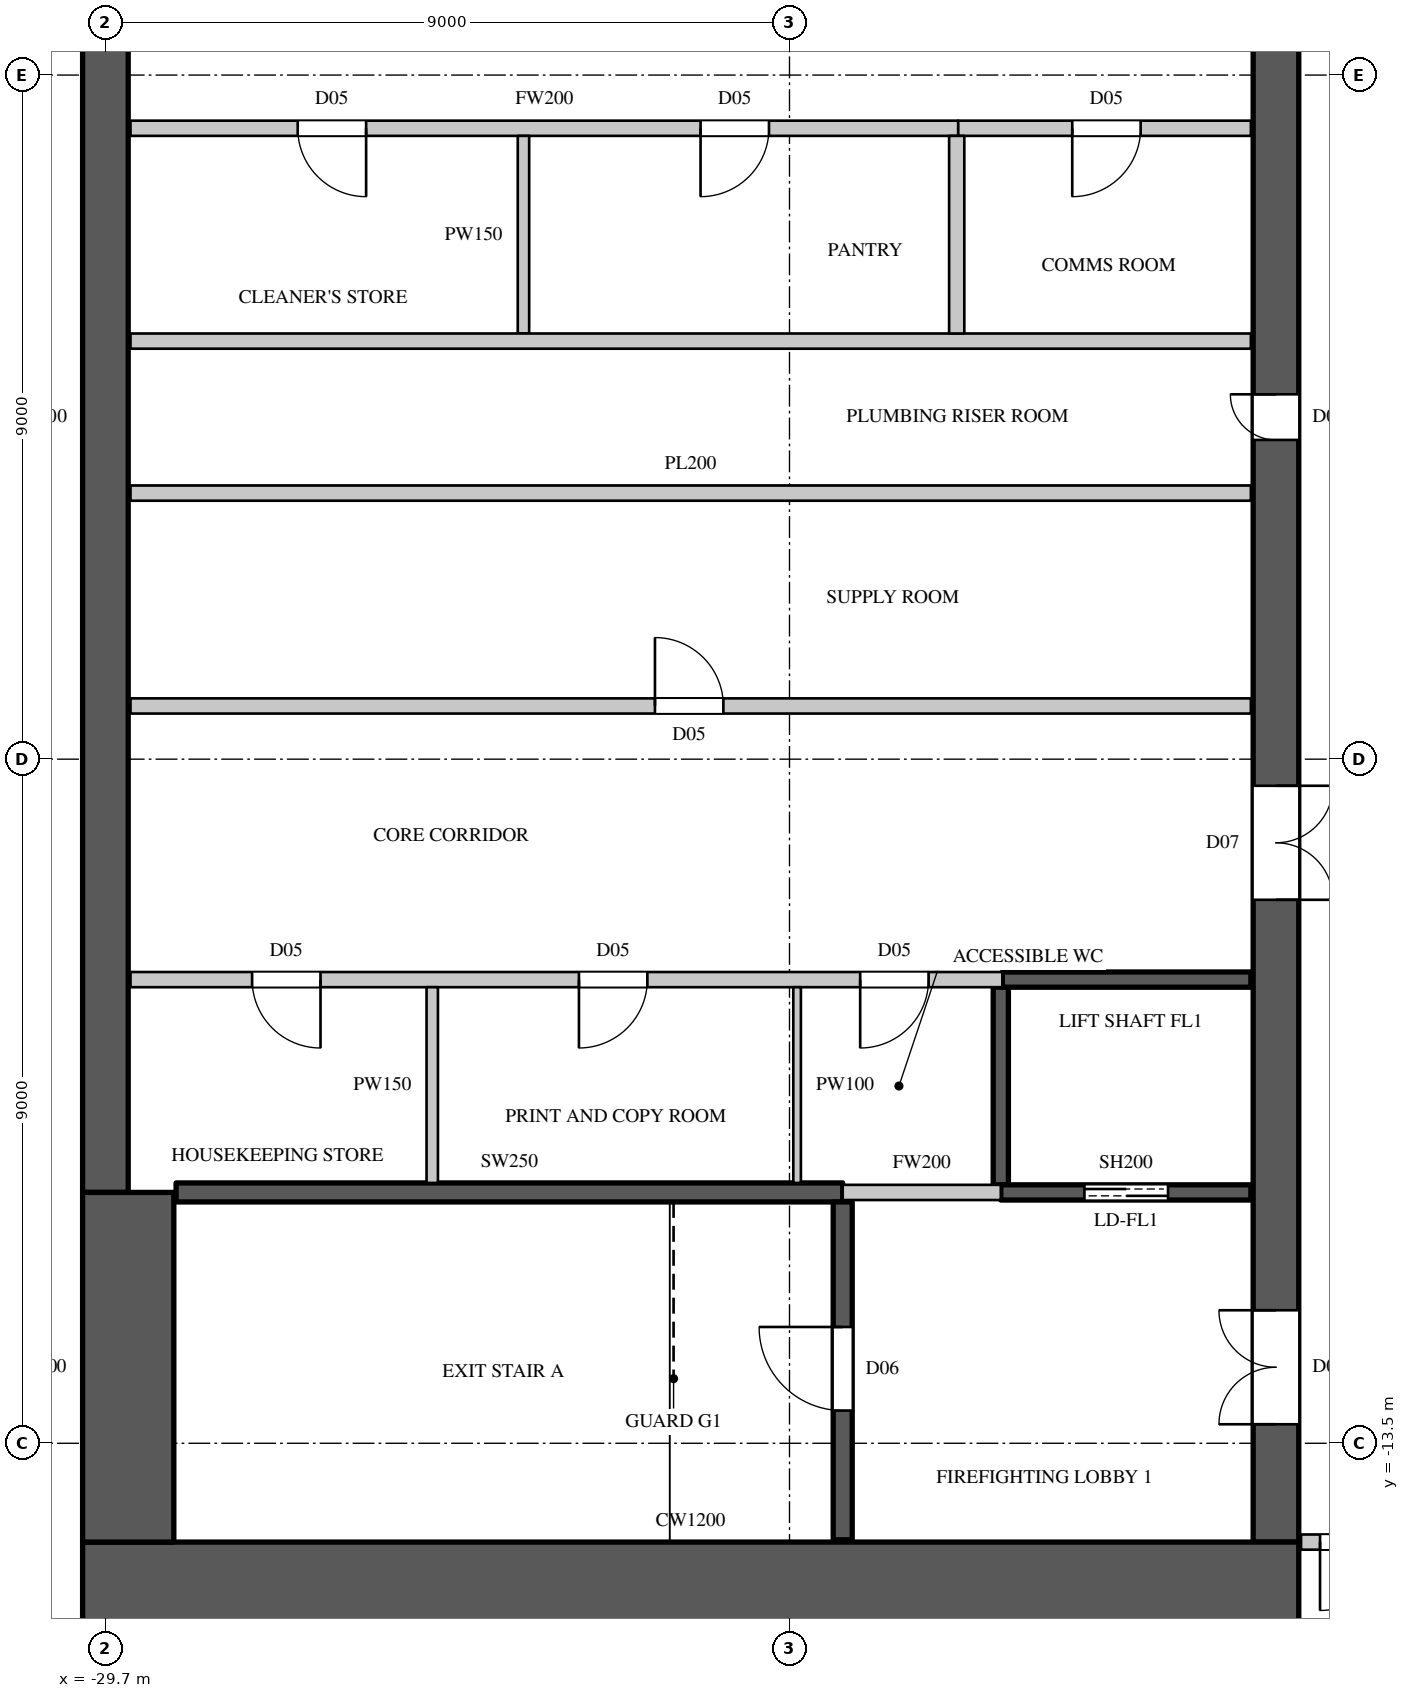
"""IFC4 building model, lengths in metres.
Left out: names, types, materials, properties, quantities, classifications, styles, units other than length and angle.
Written with IfcOpenShell. Run it as: python <this file> out.ifc"""

import sys

from ifc_helpers import new_model, si_unit, direction, frame, frame_2d, origin, place, context, subcontext, project, spatial, rectangle, extrude, element, fill, save


model = new_model("IFC4")
c1 = context("Model", 3, precision=1e-05, world=origin(), true_north=direction((0.0, 1.0)))
c2 = subcontext(c1, "Body", "Model", "MODEL_VIEW")
j1 = project(units=[si_unit("LENGTHUNIT", "METRE"), si_unit("PLANEANGLEUNIT", "RADIAN")], contexts=[c1])
p1 = place(None, origin())
s1 = spatial("IfcSite", under=j1, at=p1, CompositionType="ELEMENT")
p2 = place(p1, origin())
s2 = spatial("IfcBuilding", under=s1, at=p2, CompositionType="ELEMENT")
p3 = place(p2, frame((0.0, 0.0, 355.0)))
s3 = spatial("IfcBuildingStorey", under=s2, at=p3, CompositionType="ELEMENT", Elevation=355.0)
p4 = place(p3, frame((-30.0, -15.4, 0.0), z_axis=(0.0, 0.0, 1.0), x_axis=(1.0, 0.0, 0.0)))
e1 = element("IfcWall", 1, at=p4, inside=s3, PredefinedType="SHEAR", context=c2, shape_type="SweptSolid", body=[
    extrude(rectangle(XDim=16.0, YDim=1.2, at=frame_2d((8.0, 0.0))), origin(), (0.0, 0.0, 1.0), 4.0),
])
p5 = place(p3, frame((-14.3, -14.8, 0.0), z_axis=(0.0, 0.0, 1.0), x_axis=(0.0, 1.0, 0.0)))
e2 = element("IfcWall", 2, at=p5, inside=s3, PredefinedType="SHEAR", context=c2, shape_type="SweptSolid", body=[
    extrude(rectangle(XDim=29.6, YDim=0.6, at=frame_2d((14.8, 0.0))), origin(), (0.0, 0.0, 1.0), 4.0),
])
p6 = place(p5, frame((1.55, 0.0, 0.0)))
e3 = element("IfcOpeningElement", 3, at=p6, cuts=e2, PredefinedType="OPENING", context=c2, shape_type="SweptSolid", body=[
    extrude(rectangle(XDim=1.5, YDim=2.4, at=frame_2d((0.75, 1.2))), frame((0.0, 0.31, 0.0), z_axis=(0.0, -1.0, 0.0), x_axis=(1.0, 0.0, 0.0)), (0.0, 0.0, 1.0), 0.62),
])
p7 = place(p5, frame((26.55, 0.0, 0.0)))
e4 = element("IfcOpeningElement", 4, at=p7, cuts=e2, PredefinedType="OPENING", context=c2, shape_type="SweptSolid", body=[
    extrude(rectangle(XDim=1.5, YDim=2.4, at=frame_2d((0.75, 1.2))), frame((0.0, 0.31, 0.0), z_axis=(0.0, -1.0, 0.0), x_axis=(1.0, 0.0, 0.0)), (0.0, 0.0, 1.0), 0.62),
])
p8 = place(p5, frame((8.45, 0.0, 0.0)))
e5 = element("IfcOpeningElement", 5, at=p8, cuts=e2, PredefinedType="OPENING", context=c2, shape_type="SweptSolid", body=[
    extrude(rectangle(XDim=1.5, YDim=2.4, at=frame_2d((0.75, 1.2))), frame((0.0, 0.31, 0.0), z_axis=(0.0, -1.0, 0.0), x_axis=(1.0, 0.0, 0.0)), (0.0, 0.0, 1.0), 0.62),
])
p9 = place(p5, frame((19.65, 0.0, 0.0)))
e6 = element("IfcOpeningElement", 6, at=p9, cuts=e2, PredefinedType="OPENING", context=c2, shape_type="SweptSolid", body=[
    extrude(rectangle(XDim=1.5, YDim=2.4, at=frame_2d((0.75, 1.2))), frame((0.0, 0.31, 0.0), z_axis=(0.0, -1.0, 0.0), x_axis=(1.0, 0.0, 0.0)), (0.0, 0.0, 1.0), 0.62),
])
p10 = place(p5, frame((14.5, 0.0, 0.0)))
e7 = element("IfcOpeningElement", 7, at=p10, cuts=e2, PredefinedType="OPENING", context=c2, shape_type="SweptSolid", body=[
    extrude(rectangle(XDim=0.6, YDim=2.0, at=frame_2d((0.3, 1.0))), frame((0.0, 0.31, 0.0), z_axis=(0.0, -1.0, 0.0), x_axis=(1.0, 0.0, 0.0)), (0.0, 0.0, 1.0), 0.62),
])
p11 = place(p3, frame((-29.7, -10.2, 0.0), z_axis=(0.0, 0.0, 1.0), x_axis=(0.0, 1.0, 0.0)))
e8 = element("IfcWall", 8, at=p11, inside=s3, PredefinedType="SHEAR", context=c2, shape_type="SweptSolid", body=[
    extrude(rectangle(XDim=20.4, YDim=0.6, at=frame_2d((10.2, 0.0))), origin(), (0.0, 0.0, 1.0), 4.0),
])
p12 = place(p3, frame((-29.4, -14.8, 0.0), z_axis=(0.0, 0.0, 1.0), x_axis=(0.0, 1.0, 0.0)))
e9 = element("IfcWall", 9, at=p12, inside=s3, PredefinedType="SHEAR", context=c2, shape_type="SweptSolid", body=[
    extrude(rectangle(XDim=4.6, YDim=1.2, at=frame_2d((2.3, 0.0))), origin(), (0.0, 0.0, 1.0), 4.0),
])
p13 = place(p3, frame((-29.37, -7.4, 0.0), z_axis=(0.0, 0.0, 1.0), x_axis=(1.0, 0.0, 0.0)))
e10 = element("IfcWall", 10, at=p13, inside=s3, PredefinedType="PARTITIONING", context=c2, shape_type="SweptSolid", body=[
    extrude(rectangle(XDim=11.47, YDim=0.2, at=frame_2d((5.735, 0.0))), origin(), (0.0, 0.0, 1.0), 3.548),
])
p14 = place(p13, frame((1.6, 0.0, 0.0)))
e11 = element("IfcOpeningElement", 11, at=p14, cuts=e10, PredefinedType="OPENING", context=c2, shape_type="SweptSolid", body=[
    extrude(rectangle(XDim=0.9, YDim=2.2, at=frame_2d((0.45, 1.1))), frame((0.0, 0.11, 0.0), z_axis=(0.0, -1.0, 0.0), x_axis=(1.0, 0.0, 0.0)), (0.0, 0.0, 1.0), 0.22),
])
p15 = place(p13, frame((5.9, 0.0, 0.0)))
e12 = element("IfcOpeningElement", 12, at=p15, cuts=e10, PredefinedType="OPENING", context=c2, shape_type="SweptSolid", body=[
    extrude(rectangle(XDim=0.9, YDim=2.2, at=frame_2d((0.45, 1.1))), frame((0.0, 0.11, 0.0), z_axis=(0.0, -1.0, 0.0), x_axis=(1.0, 0.0, 0.0)), (0.0, 0.0, 1.0), 0.22),
])
p16 = place(p13, frame((9.6, 0.0, 0.0)))
e13 = element("IfcOpeningElement", 13, at=p16, cuts=e10, PredefinedType="OPENING", context=c2, shape_type="SweptSolid", body=[
    extrude(rectangle(XDim=0.9, YDim=2.2, at=frame_2d((0.45, 1.1))), frame((0.0, 0.11, 0.0), z_axis=(0.0, -1.0, 0.0), x_axis=(1.0, 0.0, 0.0)), (0.0, 0.0, 1.0), 0.22),
])
p17 = place(p3, frame((-29.37, -3.8, 0.0), z_axis=(0.0, 0.0, 1.0), x_axis=(1.0, 0.0, 0.0)))
e14 = element("IfcWall", 14, at=p17, inside=s3, PredefinedType="PARTITIONING", context=c2, shape_type="SweptSolid", body=[
    extrude(rectangle(XDim=14.74, YDim=0.2, at=frame_2d((7.37, 0.0))), origin(), (0.0, 0.0, 1.0), 3.548),
])
p18 = place(p17, frame((6.9, 0.0, 0.0)))
e15 = element("IfcOpeningElement", 15, at=p18, cuts=e14, PredefinedType="OPENING", context=c2, shape_type="SweptSolid", body=[
    extrude(rectangle(XDim=0.9, YDim=2.2, at=frame_2d((0.45, 1.1))), frame((0.0, 0.11, 0.0), z_axis=(0.0, -1.0, 0.0), x_axis=(1.0, 0.0, 0.0)), (0.0, 0.0, 1.0), 0.22),
])
p19 = place(p3, frame((-29.37, 3.8, 0.0), z_axis=(0.0, 0.0, 1.0), x_axis=(1.0, 0.0, 0.0)))
e16 = element("IfcWall", 16, at=p19, inside=s3, PredefinedType="PARTITIONING", context=c2, shape_type="SweptSolid", body=[
    extrude(rectangle(XDim=10.89, YDim=0.2, at=frame_2d((5.445, 0.0))), origin(), (0.0, 0.0, 1.0), 3.548),
])
p20 = place(p19, frame((2.2, 0.0, 0.0)))
e17 = element("IfcOpeningElement", 17, at=p20, cuts=e16, PredefinedType="OPENING", context=c2, shape_type="SweptSolid", body=[
    extrude(rectangle(XDim=0.9, YDim=2.2, at=frame_2d((0.45, 1.1))), frame((0.0, 0.11, 0.0), z_axis=(0.0, -1.0, 0.0), x_axis=(1.0, 0.0, 0.0)), (0.0, 0.0, 1.0), 0.22),
])
p21 = place(p19, frame((7.5, 0.0, 0.0)))
e18 = element("IfcOpeningElement", 18, at=p21, cuts=e16, PredefinedType="OPENING", context=c2, shape_type="SweptSolid", body=[
    extrude(rectangle(XDim=0.9, YDim=2.2, at=frame_2d((0.45, 1.1))), frame((0.0, 0.11, 0.0), z_axis=(0.0, -1.0, 0.0), x_axis=(1.0, 0.0, 0.0)), (0.0, 0.0, 1.0), 0.22),
])
p22 = place(p3, frame((-20.0, -10.2, 0.0), z_axis=(0.0, 0.0, 1.0), x_axis=(1.0, 0.0, 0.0)))
e19 = element("IfcWall", 19, at=p22, inside=s3, PredefinedType="PARTITIONING", context=c2, shape_type="SweptSolid", body=[
    extrude(rectangle(XDim=2.08, YDim=0.2, at=frame_2d((1.04, 0.0))), origin(), (0.0, 0.0, 1.0), 3.548),
])
p23 = place(p3, frame((-25.4, -10.075, 0.0), z_axis=(0.0, 0.0, 1.0), x_axis=(0.0, 1.0, 0.0)))
e20 = element("IfcWall", 20, at=p23, inside=s3, PredefinedType="PARTITIONING", context=c2, shape_type="SweptSolid", body=[
    extrude(rectangle(XDim=2.575, YDim=0.15, at=frame_2d((1.288, 0.0))), origin(), (0.0, 0.0, 1.0), 3.548),
])
p24 = place(p3, frame((-24.2, 1.1, 0.0), z_axis=(0.0, 0.0, 1.0), x_axis=(0.0, 1.0, 0.0)))
e21 = element("IfcWall", 21, at=p24, inside=s3, PredefinedType="PARTITIONING", context=c2, shape_type="SweptSolid", body=[
    extrude(rectangle(XDim=2.6, YDim=0.15, at=frame_2d((1.3, 0.0))), origin(), (0.0, 0.0, 1.0), 3.548),
])
for number, where, z_axis, x_axis in (
    (22, (-29.37, -1.0, 0.0), (0.0, 0.0, 1.0), (1.0, 0.0, 0.0)),
    (23, (-29.37, 1.0, 0.0), (0.0, 0.0, 1.0), (1.0, 0.0, 0.0)),
):
    element("IfcWall", number, at=place(p3, frame(where, z_axis=z_axis, x_axis=x_axis)), inside=s3, PredefinedType="PARTITIONING", context=c2, shape_type="SweptSolid", body=[
        extrude(rectangle(XDim=14.74, YDim=0.2, at=frame_2d((7.37, 0.0))), origin(), (0.0, 0.0, 1.0), 3.548),
    ])
p25 = place(p3, frame((-18.48, 3.8, 0.0), z_axis=(0.0, 0.0, 1.0), x_axis=(1.0, 0.0, 0.0)))
e24 = element("IfcWall", 24, at=p25, inside=s3, PredefinedType="PARTITIONING", context=c2, shape_type="SweptSolid", body=[
    extrude(rectangle(XDim=3.85, YDim=0.2, at=frame_2d((1.925, 0.0))), origin(), (0.0, 0.0, 1.0), 3.548),
])
p26 = place(p25, frame((1.5, 0.0, 0.0)))
e25 = element("IfcOpeningElement", 25, at=p26, cuts=e24, PredefinedType="OPENING", context=c2, shape_type="SweptSolid", body=[
    extrude(rectangle(XDim=0.9, YDim=2.2, at=frame_2d((0.45, 1.1))), frame((0.0, 0.11, 0.0), z_axis=(0.0, -1.0, 0.0), x_axis=(1.0, 0.0, 0.0)), (0.0, 0.0, 1.0), 0.22),
])
p27 = place(p3, frame((-18.5, 1.1, 0.0), z_axis=(0.0, 0.0, 1.0), x_axis=(0.0, 1.0, 0.0)))
e26 = element("IfcWall", 26, at=p27, inside=s3, PredefinedType="PARTITIONING", context=c2, shape_type="SweptSolid", body=[
    extrude(rectangle(XDim=2.6, YDim=0.2, at=frame_2d((1.3, 0.0))), origin(), (0.0, 0.0, 1.0), 3.548),
])
p28 = place(p3, frame((-13.97, -14.8, 0.0), z_axis=(0.0, 0.0, 1.0), x_axis=(1.0, 0.0, 0.0)))
e27 = element("IfcWall", 27, at=p28, inside=s3, PredefinedType="PARTITIONING", context=c2, shape_type="SweptSolid", body=[
    extrude(rectangle(XDim=2.27, YDim=0.2, at=frame_2d((1.135, 0.0))), origin(), (0.0, 0.0, 1.0), 3.548),
])
p29 = place(p28, frame((0.25, 0.0, 0.0)))
e28 = element("IfcOpeningElement", 28, at=p29, cuts=e27, PredefinedType="OPENING", context=c2, shape_type="SweptSolid", body=[
    extrude(rectangle(XDim=1.8, YDim=2.4, at=frame_2d((0.9, 1.2))), frame((0.0, 0.11, 0.0), z_axis=(0.0, -1.0, 0.0), x_axis=(1.0, 0.0, 0.0)), (0.0, 0.0, 1.0), 0.22),
])
p30 = place(p3, frame((-17.92, -10.1, 0.0), z_axis=(0.0, 0.0, 1.0), x_axis=(0.0, 1.0, 0.0)))
e29 = element("IfcWall", 29, at=p30, inside=s3, PredefinedType="SHEAR", context=c2, shape_type="SweptSolid", body=[
    extrude(rectangle(XDim=2.6, YDim=0.2, at=frame_2d((1.3, 0.0))), origin(), (0.0, 0.0, 1.0), 3.548),
])
p31 = place(p3, frame((-17.92, -10.2, 0.0), z_axis=(0.0, 0.0, 1.0), x_axis=(1.0, 0.0, 0.0)))
e30 = element("IfcWall", 30, at=p31, inside=s3, PredefinedType="SHEAR", context=c2, shape_type="SweptSolid", body=[
    extrude(rectangle(XDim=3.29, YDim=0.2, at=frame_2d((1.645, 0.0))), origin(), (0.0, 0.0, 1.0), 3.548),
])
p32 = place(p31, frame((1.1, 0.0, 0.0)))
e31 = element("IfcOpeningElement", 31, at=p32, cuts=e30, PredefinedType="OPENING", context=c2, shape_type="SweptSolid", body=[
    extrude(rectangle(XDim=1.1, YDim=2.2, at=frame_2d((0.55, 1.1))), frame((0.0, 0.11, 0.0), z_axis=(0.0, -1.0, 0.0), x_axis=(1.0, 0.0, 0.0)), (0.0, 0.0, 1.0), 0.22),
])
p33 = place(p3, frame((-17.9, -7.4, 0.0), z_axis=(0.0, 0.0, 1.0), x_axis=(1.0, 0.0, 0.0)))
e32 = element("IfcWall", 32, at=p33, inside=s3, PredefinedType="SHEAR", context=c2, shape_type="SweptSolid", body=[
    extrude(rectangle(XDim=3.27, YDim=0.2, at=frame_2d((1.635, 0.0))), origin(), (0.0, 0.0, 1.0), 3.548),
])
p34 = place(p3, frame((-28.77, -10.2, 0.0), z_axis=(0.0, 0.0, 1.0), x_axis=(1.0, 0.0, 0.0)))
e33 = element("IfcWall", 33, at=p34, inside=s3, PredefinedType="SHEAR", context=c2, shape_type="SweptSolid", body=[
    extrude(rectangle(XDim=8.77, YDim=0.25, at=frame_2d((4.385, 0.0))), origin(), (0.0, 0.0, 1.0), 3.548),
])
p35 = place(p3, frame((-20.0, -14.77, 0.0), z_axis=(0.0, 0.0, 1.0), x_axis=(0.0, 1.0, 0.0)))
e34 = element("IfcWall", 34, at=p35, inside=s3, PredefinedType="SHEAR", context=c2, shape_type="SweptSolid", body=[
    extrude(rectangle(XDim=4.445, YDim=0.25, at=frame_2d((2.223, 0.0))), origin(), (0.0, 0.0, 1.0), 3.548),
])
p36 = place(p35, frame((1.7, 0.0, 0.0)))
e35 = element("IfcOpeningElement", 35, at=p36, cuts=e34, PredefinedType="OPENING", context=c2, shape_type="SweptSolid", body=[
    extrude(rectangle(XDim=1.1, YDim=2.2, at=frame_2d((0.55, 1.1))), frame((0.0, 0.135, 0.0), z_axis=(0.0, -1.0, 0.0), x_axis=(1.0, 0.0, 0.0)), (0.0, 0.0, 1.0), 0.27),
])
p37 = place(p3, frame((-20.6, -10.075, 0.0), z_axis=(0.0, 0.0, 1.0), x_axis=(0.0, 1.0, 0.0)))
e36 = element("IfcWall", 36, at=p37, inside=s3, PredefinedType="PARTITIONING", context=c2, shape_type="SweptSolid", body=[
    extrude(rectangle(XDim=2.575, YDim=0.1, at=frame_2d((1.288, 0.0))), origin(), (0.0, 0.0, 1.0), 3.548),
])
p38 = place(p36, origin())
e37 = element("IfcDoor", 37, at=p38, inside=s3, OperationType="SINGLE_SWING_RIGHT", PredefinedType="DOOR", context=c2, shape_type="SweptSolid", body=[
    extrude(rectangle(XDim=1.1, YDim=2.2, at=frame_2d((0.55, 1.1))), frame((0.0, 0.025, 0.0), z_axis=(0.0, -1.0, 0.0), x_axis=(1.0, 0.0, 0.0)), (0.0, 0.0, 1.0), 0.05),
])
fill(e35, e37)
p39 = place(p14, origin())
e38 = element("IfcDoor", 38, at=p39, inside=s3, OperationType="SINGLE_SWING_LEFT", PredefinedType="DOOR", context=c2, shape_type="SweptSolid", body=[
    extrude(rectangle(XDim=0.9, YDim=2.2, at=frame_2d((0.45, 1.1))), frame((0.0, 0.025, 0.0), z_axis=(0.0, -1.0, 0.0), x_axis=(1.0, 0.0, 0.0)), (0.0, 0.0, 1.0), 0.05),
])
fill(e11, e38)
p40 = place(p15, origin())
e39 = element("IfcDoor", 39, at=p40, inside=s3, OperationType="SINGLE_SWING_RIGHT", PredefinedType="DOOR", context=c2, shape_type="SweptSolid", body=[
    extrude(rectangle(XDim=0.9, YDim=2.2, at=frame_2d((0.45, 1.1))), frame((0.0, 0.025, 0.0), z_axis=(0.0, -1.0, 0.0), x_axis=(1.0, 0.0, 0.0)), (0.0, 0.0, 1.0), 0.05),
])
fill(e12, e39)
p41 = place(p16, origin())
e40 = element("IfcDoor", 40, at=p41, inside=s3, OperationType="SINGLE_SWING_RIGHT", PredefinedType="DOOR", context=c2, shape_type="SweptSolid", body=[
    extrude(rectangle(XDim=0.9, YDim=2.2, at=frame_2d((0.45, 1.1))), frame((0.0, 0.025, 0.0), z_axis=(0.0, -1.0, 0.0), x_axis=(1.0, 0.0, 0.0)), (0.0, 0.0, 1.0), 0.05),
])
fill(e13, e40)
p42 = place(p18, origin())
e41 = element("IfcDoor", 41, at=p42, inside=s3, OperationType="SINGLE_SWING_LEFT", PredefinedType="DOOR", context=c2, shape_type="SweptSolid", body=[
    extrude(rectangle(XDim=0.9, YDim=2.2, at=frame_2d((0.45, 1.1))), frame((0.0, 0.025, 0.0), z_axis=(0.0, -1.0, 0.0), x_axis=(1.0, 0.0, 0.0)), (0.0, 0.0, 1.0), 0.05),
])
fill(e15, e41)
p43 = place(p20, origin())
e42 = element("IfcDoor", 42, at=p43, inside=s3, OperationType="SINGLE_SWING_LEFT", PredefinedType="DOOR", context=c2, shape_type="SweptSolid", body=[
    extrude(rectangle(XDim=0.9, YDim=2.2, at=frame_2d((0.45, 1.1))), frame((0.0, 0.025, 0.0), z_axis=(0.0, -1.0, 0.0), x_axis=(1.0, 0.0, 0.0)), (0.0, 0.0, 1.0), 0.05),
])
fill(e17, e42)
p44 = place(p21, origin())
e43 = element("IfcDoor", 43, at=p44, inside=s3, OperationType="SINGLE_SWING_RIGHT", PredefinedType="DOOR", context=c2, shape_type="SweptSolid", body=[
    extrude(rectangle(XDim=0.9, YDim=2.2, at=frame_2d((0.45, 1.1))), frame((0.0, 0.025, 0.0), z_axis=(0.0, -1.0, 0.0), x_axis=(1.0, 0.0, 0.0)), (0.0, 0.0, 1.0), 0.05),
])
fill(e18, e43)
p45 = place(p26, origin())
e44 = element("IfcDoor", 44, at=p45, inside=s3, OperationType="SINGLE_SWING_RIGHT", PredefinedType="DOOR", context=c2, shape_type="SweptSolid", body=[
    extrude(rectangle(XDim=0.9, YDim=2.2, at=frame_2d((0.45, 1.1))), frame((0.0, 0.025, 0.0), z_axis=(0.0, -1.0, 0.0), x_axis=(1.0, 0.0, 0.0)), (0.0, 0.0, 1.0), 0.05),
])
fill(e25, e44)
p46 = place(p32, origin())
e45 = element("IfcDoor", 45, at=p46, inside=s3, OperationType="DOUBLE_DOOR_SLIDING", PredefinedType="DOOR", context=c2, shape_type="SweptSolid", body=[
    extrude(rectangle(XDim=1.1, YDim=2.2, at=frame_2d((0.55, 1.1))), frame((0.0, 0.025, 0.0), z_axis=(0.0, -1.0, 0.0), x_axis=(1.0, 0.0, 0.0)), (0.0, 0.0, 1.0), 0.05),
])
fill(e31, e45)
p47 = place(p29, origin())
e46 = element("IfcDoor", 46, at=p47, inside=s3, OperationType="DOUBLE_DOOR_SINGLE_SWING", PredefinedType="DOOR", context=c2, shape_type="SweptSolid", body=[
    extrude(rectangle(XDim=1.8, YDim=2.4, at=frame_2d((0.9, 1.2))), frame((0.0, 0.025, 0.0), z_axis=(0.0, -1.0, 0.0), x_axis=(1.0, 0.0, 0.0)), (0.0, 0.0, 1.0), 0.05),
])
fill(e28, e46)
p48 = place(p6, origin())
e47 = element("IfcDoor", 47, at=p48, inside=s3, OperationType="DOUBLE_DOOR_SINGLE_SWING", PredefinedType="DOOR", context=c2, shape_type="SweptSolid", body=[
    extrude(rectangle(XDim=1.5, YDim=2.4, at=frame_2d((0.75, 1.2))), frame((0.0, 0.295, 0.0), z_axis=(0.0, -1.0, 0.0), x_axis=(1.0, 0.0, 0.0)), (0.0, 0.0, 1.0), 0.05),
])
fill(e3, e47)
p49 = place(p8, origin())
e48 = element("IfcDoor", 48, at=p49, inside=s3, OperationType="DOUBLE_DOOR_SINGLE_SWING", PredefinedType="DOOR", context=c2, shape_type="SweptSolid", body=[
    extrude(rectangle(XDim=1.5, YDim=2.4, at=frame_2d((0.75, 1.2))), frame((0.0, -0.245, 0.0), z_axis=(0.0, -1.0, 0.0), x_axis=(1.0, 0.0, 0.0)), (0.0, 0.0, 1.0), 0.05),
])
fill(e5, e48)
p50 = place(p10, origin())
e49 = element("IfcDoor", 49, at=p50, inside=s3, OperationType="SINGLE_SWING_RIGHT", PredefinedType="DOOR", context=c2, shape_type="SweptSolid", body=[
    extrude(rectangle(XDim=0.6, YDim=2.0, at=frame_2d((0.3, 1.0))), frame((0.0, 0.295, 0.0), z_axis=(0.0, -1.0, 0.0), x_axis=(1.0, 0.0, 0.0)), (0.0, 0.0, 1.0), 0.05),
])
fill(e7, e49)
save(model, sys.argv[1])
